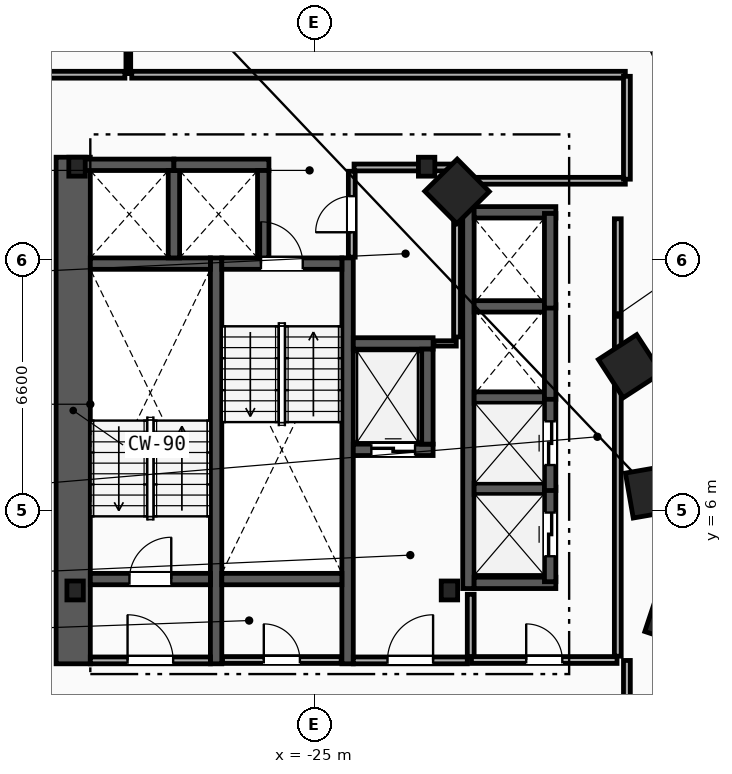
"""IFC4 building model, lengths in metres.
Left out: names, types, materials, properties, quantities, classifications, styles, units other than length and angle.
Written with IfcOpenShell. Run it as: python <this file> out.ifc"""

import sys

from ifc_helpers import new_model, si_unit, direction, frame, frame_2d, origin, origin_2d, place, context, subcontext, project, spatial, rectangle, i_section, extrude, element, fill, save


model = new_model("IFC4")
c1 = context("Model", 3, precision=1e-05, world=origin(), true_north=direction((0.0, 1.0)))
c2 = subcontext(c1, "Body", "Model", "MODEL_VIEW")
j1 = project(units=[si_unit("LENGTHUNIT", "METRE"), si_unit("PLANEANGLEUNIT", "RADIAN")], contexts=[c1])
p1 = place(None, origin())
s1 = spatial("IfcSite", under=j1, at=p1, CompositionType="ELEMENT")
p2 = place(p1, origin())
s2 = spatial("IfcBuilding", under=s1, at=p2, CompositionType="ELEMENT")
p3 = place(p2, frame((0.0, 0.0, 73.4)))
s3 = spatial("IfcBuildingStorey", under=s2, at=p3, CompositionType="ELEMENT", Elevation=73.4)
for number, where, z_axis, x_axis in (
    (1, (-31.3, 3.9, 0.0), (0.0, 0.0, 1.0), (1.0, 0.0, 0.0)),
    (2, (-21.45, 3.9, 0.0), (0.0, 0.0, 1.0), (1.0, 0.0, 0.0)),
    (3, (-22.05, 15.05, 0.0), (0.0, 0.0, 1.0), (1.0, 0.0, 0.0)),
    (4, (-31.25, 15.05, 0.0), (0.0, 0.0, 1.0), (1.0, 0.0, 0.0)),
):
    element("IfcColumn", number, at=place(p3, frame(where, z_axis=z_axis, x_axis=x_axis)), inside=s3, PredefinedType="COLUMN", context=c2, shape_type="SweptSolid", body=[
        extrude(i_section(OverallWidth=0.432, OverallDepth=0.498, WebThickness=0.056, FlangeThickness=0.089, FilletRadius=0.018, at=origin_2d()), origin(), (0.0, 0.0, 1.0), 3.8),
    ])
for number, where, z_axis, x_axis in (
    (5, (-15.55, 3.2, 0.0), (0.0, 0.0, 1.0), (0.315, 0.949, 0.0)),
    (6, (-16.125, 6.5, 0.0), (0.0, 0.0, 1.0), (-0.172, 0.985, 0.0)),
    (7, (-16.7, 9.8, 0.0), (0.0, 0.0, 1.0), (-0.544, 0.839, 0.0)),
    (8, (-21.25, 14.4, 0.0), (0.0, 0.0, 1.0), (-0.703, 0.711, 0.0)),
):
    element("IfcColumn", number, at=place(p3, frame(where, z_axis=z_axis, x_axis=x_axis)), inside=s3, PredefinedType="COLUMN", context=c2, shape_type="SweptSolid", body=[
        extrude(rectangle(XDim=1.2, YDim=1.2, at=origin_2d()), origin(), (0.0, 0.0, 1.0), 3.8),
    ])
p4 = place(p3, frame((-31.35, 1.97, 0.0), z_axis=(0.0, 0.0, 1.0), x_axis=(0.0, 1.0, 0.0)))
e9 = element("IfcWall", 9, at=p4, inside=s3, PredefinedType="SHEAR", context=c2, shape_type="SweptSolid", body=[
    extrude(rectangle(XDim=13.33, YDim=0.9, at=frame_2d((6.665, 0.0))), origin(), (0.0, 0.0, 1.0), 3.52),
])
for number, where, z_axis, x_axis in (
    (10, (-27.59, 1.97, 0.0), (0.0, 0.0, 1.0), (0.0, 1.0, 0.0)),
    (11, (-24.13, 1.97, 0.0), (0.0, 0.0, 1.0), (0.0, 1.0, 0.0)),
):
    element("IfcWall", number, at=place(p3, frame(where, z_axis=z_axis, x_axis=x_axis)), inside=s3, PredefinedType="SHEAR", context=c2, shape_type="SweptSolid", body=[
        extrude(rectangle(XDim=10.68, YDim=0.3, at=frame_2d((5.34, 0.0))), origin(), (0.0, 0.0, 1.0), 3.52),
    ])
p5 = place(p3, frame((-30.9, 4.2, 0.0), z_axis=(0.0, 0.0, 1.0), x_axis=(1.0, 0.0, 0.0)))
e12 = element("IfcWall", 12, at=p5, inside=s3, PredefinedType="SHEAR", context=c2, shape_type="SweptSolid", body=[
    extrude(rectangle(XDim=3.16, YDim=0.3, at=frame_2d((1.58, 0.0))), origin(), (0.0, 0.0, 1.0), 3.52),
])
p6 = place(p5, frame((1.03, 0.0, 0.0)))
e13 = element("IfcOpeningElement", 13, at=p6, cuts=e12, PredefinedType="OPENING", context=c2, shape_type="SweptSolid", body=[
    extrude(rectangle(XDim=1.1, YDim=2.15, at=frame_2d((0.55, 1.075))), frame((0.0, 0.16, 0.0), z_axis=(0.0, -1.0, 0.0), x_axis=(1.0, 0.0, 0.0)), (0.0, 0.0, 1.0), 0.32),
])
p7 = place(p3, frame((-30.9, 12.5, 0.0), z_axis=(0.0, 0.0, 1.0), x_axis=(1.0, 0.0, 0.0)))
e14 = element("IfcWall", 14, at=p7, inside=s3, PredefinedType="SHEAR", context=c2, shape_type="SweptSolid", body=[
    extrude(rectangle(XDim=3.16, YDim=0.3, at=frame_2d((1.58, 0.0))), origin(), (0.0, 0.0, 1.0), 3.52),
])
p8 = place(p3, frame((-27.44, 12.5, 0.0), z_axis=(0.0, 0.0, 1.0), x_axis=(1.0, 0.0, 0.0)))
e15 = element("IfcWall", 15, at=p8, inside=s3, PredefinedType="SHEAR", context=c2, shape_type="SweptSolid", body=[
    extrude(rectangle(XDim=3.16, YDim=0.3, at=frame_2d((1.58, 0.0))), origin(), (0.0, 0.0, 1.0), 3.52),
])
p9 = place(p8, frame((1.03, 0.0, 0.0)))
e16 = element("IfcOpeningElement", 16, at=p9, cuts=e15, PredefinedType="OPENING", context=c2, shape_type="SweptSolid", body=[
    extrude(rectangle(XDim=1.1, YDim=2.15, at=frame_2d((0.55, 1.075))), frame((0.0, 0.16, 0.0), z_axis=(0.0, -1.0, 0.0), x_axis=(1.0, 0.0, 0.0)), (0.0, 0.0, 1.0), 0.32),
])
p10 = place(p3, frame((-27.44, 4.2, 0.0), z_axis=(0.0, 0.0, 1.0), x_axis=(1.0, 0.0, 0.0)))
e17 = element("IfcWall", 17, at=p10, inside=s3, PredefinedType="SHEAR", context=c2, shape_type="SweptSolid", body=[
    extrude(rectangle(XDim=3.16, YDim=0.3, at=frame_2d((1.58, 0.0))), origin(), (0.0, 0.0, 1.0), 3.52),
])
p11 = place(p3, frame((-20.89, 2.15, 0.0), z_axis=(0.0, 0.0, 1.0), x_axis=(0.0, 1.0, 0.0)))
e18 = element("IfcWall", 18, at=p11, inside=s3, PredefinedType="PARTITIONING", context=c2, shape_type="SweptSolid", body=[
    extrude(rectangle(XDim=1.65, YDim=0.18, at=frame_2d((0.825, 0.0))), origin(), (0.0, 0.0, 1.0), 3.52),
])
p12 = place(p3, frame((-23.98, 2.06, 0.0), z_axis=(0.0, 0.0, 1.0), x_axis=(1.0, 0.0, 0.0)))
e19 = element("IfcWall", 19, at=p12, inside=s3, PredefinedType="PARTITIONING", context=c2, shape_type="SweptSolid", body=[
    extrude(rectangle(XDim=3.0, YDim=0.18, at=frame_2d((1.5, 0.0))), origin(), (0.0, 0.0, 1.0), 3.52),
])
p13 = place(p12, frame((0.9, 0.0, 0.0)))
e20 = element("IfcOpeningElement", 20, at=p13, cuts=e19, PredefinedType="OPENING", context=c2, shape_type="SweptSolid", body=[
    extrude(rectangle(XDim=1.2, YDim=2.15, at=frame_2d((0.6, 1.075))), frame((0.0, 0.1, 0.0), z_axis=(0.0, -1.0, 0.0), x_axis=(1.0, 0.0, 0.0)), (0.0, 0.0, 1.0), 0.2),
])
p14 = place(p3, frame((-30.9, 2.06, 0.0), z_axis=(0.0, 0.0, 1.0), x_axis=(1.0, 0.0, 0.0)))
e21 = element("IfcWall", 21, at=p14, inside=s3, PredefinedType="PARTITIONING", context=c2, shape_type="SweptSolid", body=[
    extrude(rectangle(XDim=3.16, YDim=0.18, at=frame_2d((1.58, 0.0))), origin(), (0.0, 0.0, 1.0), 3.52),
])
p15 = place(p14, frame((0.98, 0.0, 0.0)))
e22 = element("IfcOpeningElement", 22, at=p15, cuts=e21, PredefinedType="OPENING", context=c2, shape_type="SweptSolid", body=[
    extrude(rectangle(XDim=1.2, YDim=2.15, at=frame_2d((0.6, 1.075))), frame((0.0, 0.1, 0.0), z_axis=(0.0, -1.0, 0.0), x_axis=(1.0, 0.0, 0.0)), (0.0, 0.0, 1.0), 0.2),
])
p16 = place(p3, frame((-23.98, 7.6, 0.0), z_axis=(0.0, 0.0, 1.0), x_axis=(1.0, 0.0, 0.0)))
e23 = element("IfcWall", 23, at=p16, inside=s3, PredefinedType="SHEAR", context=c2, shape_type="SweptSolid", body=[
    extrude(rectangle(XDim=2.1, YDim=0.3, at=frame_2d((1.05, 0.0))), origin(), (0.0, 0.0, 1.0), 3.52),
])
p17 = place(p16, frame((0.475, 0.0, 0.0)))
e24 = element("IfcOpeningElement", 24, at=p17, cuts=e23, PredefinedType="OPENING", context=c2, shape_type="SweptSolid", body=[
    extrude(rectangle(XDim=1.15, YDim=2.2, at=frame_2d((0.575, 1.1))), frame((0.0, 0.16, 0.0), z_axis=(0.0, -1.0, 0.0), x_axis=(1.0, 0.0, 0.0)), (0.0, 0.0, 1.0), 0.32),
])
p18 = place(p3, frame((-23.98, 10.4, 0.0), z_axis=(0.0, 0.0, 1.0), x_axis=(1.0, 0.0, 0.0)))
e25 = element("IfcWall", 25, at=p18, inside=s3, PredefinedType="SHEAR", context=c2, shape_type="SweptSolid", body=[
    extrude(rectangle(XDim=2.1, YDim=0.3, at=frame_2d((1.05, 0.0))), origin(), (0.0, 0.0, 1.0), 3.52),
])
for number, where, z_axis, x_axis in (
    (26, (-22.03, 7.75, 0.0), (0.0, 0.0, 1.0), (0.0, 1.0, 0.0)),
    (27, (-31.2, 15.1, 0.0), (0.0, 0.0, 1.0), (1.0, 0.0, 0.0)),
):
    element("IfcWall", number, at=place(p3, frame(where, z_axis=z_axis, x_axis=x_axis)), inside=s3, PredefinedType="SHEAR", context=c2, shape_type="SweptSolid", body=[
        extrude(rectangle(XDim=2.5, YDim=0.3, at=frame_2d((1.25, 0.0))), origin(), (0.0, 0.0, 1.0), 3.52),
    ])
p19 = place(p3, frame((-28.7, 12.65, 0.0), z_axis=(0.0, 0.0, 1.0), x_axis=(0.0, 1.0, 0.0)))
e28 = element("IfcWall", 28, at=p19, inside=s3, PredefinedType="SHEAR", context=c2, shape_type="SweptSolid", body=[
    extrude(rectangle(XDim=2.3, YDim=0.3, at=frame_2d((1.15, 0.0))), origin(), (0.0, 0.0, 1.0), 3.52),
])
p20 = place(p3, frame((-28.7, 15.1, 0.0), z_axis=(0.0, 0.0, 1.0), x_axis=(1.0, 0.0, 0.0)))
e29 = element("IfcWall", 29, at=p20, inside=s3, PredefinedType="SHEAR", context=c2, shape_type="SweptSolid", body=[
    extrude(rectangle(XDim=2.5, YDim=0.3, at=frame_2d((1.25, 0.0))), origin(), (0.0, 0.0, 1.0), 3.52),
])
p21 = place(p3, frame((-26.35, 12.65, 0.0), z_axis=(0.0, 0.0, 1.0), x_axis=(0.0, 1.0, 0.0)))
e30 = element("IfcWall", 30, at=p21, inside=s3, PredefinedType="SHEAR", context=c2, shape_type="SweptSolid", body=[
    extrude(rectangle(XDim=2.3, YDim=0.3, at=frame_2d((1.15, 0.0))), origin(), (0.0, 0.0, 1.0), 3.52),
])
p22 = place(p3, frame((-20.95, 3.95, 0.0), z_axis=(0.0, 0.0, 1.0), x_axis=(0.0, 1.0, 0.0)))
e31 = element("IfcWall", 31, at=p22, inside=s3, PredefinedType="SHEAR", context=c2, shape_type="SweptSolid", body=[
    extrude(rectangle(XDim=10.05, YDim=0.3, at=frame_2d((5.025, 0.0))), origin(), (0.0, 0.0, 1.0), 3.52),
])
for number, where, z_axis, x_axis in (
    (32, (-20.8, 4.1, 0.0), (0.0, 0.0, 1.0), (1.0, 0.0, 0.0)),
    (33, (-20.8, 13.85, 0.0), (0.0, 0.0, 1.0), (1.0, 0.0, 0.0)),
):
    element("IfcWall", number, at=place(p3, frame(where, z_axis=z_axis, x_axis=x_axis)), inside=s3, PredefinedType="SHEAR", context=c2, shape_type="SweptSolid", body=[
        extrude(rectangle(XDim=2.15, YDim=0.3, at=frame_2d((1.075, 0.0))), origin(), (0.0, 0.0, 1.0), 3.52),
    ])
for number, where, z_axis, x_axis in (
    (34, (-20.8, 6.575, 0.0), (0.0, 0.0, 1.0), (1.0, 0.0, 0.0)),
    (35, (-20.8, 8.975, 0.0), (0.0, 0.0, 1.0), (1.0, 0.0, 0.0)),
    (36, (-20.8, 11.375, 0.0), (0.0, 0.0, 1.0), (1.0, 0.0, 0.0)),
):
    element("IfcWall", number, at=place(p3, frame(where, z_axis=z_axis, x_axis=x_axis)), inside=s3, PredefinedType="SHEAR", context=c2, shape_type="SweptSolid", body=[
        extrude(rectangle(XDim=1.85, YDim=0.3, at=frame_2d((0.925, 0.0))), origin(), (0.0, 0.0, 1.0), 3.52),
    ])
p23 = place(p3, frame((-18.8, 4.13, 0.0), z_axis=(0.0, 0.0, 1.0), x_axis=(0.0, 1.0, 0.0)))
e37 = element("IfcWall", 37, at=p23, inside=s3, PredefinedType="SHEAR", context=c2, shape_type="SweptSolid", body=[
    extrude(rectangle(XDim=2.49, YDim=0.3, at=frame_2d((1.245, 0.0))), origin(), (0.0, 0.0, 1.0), 3.52),
])
p24 = place(p23, frame((0.67, 0.0, 0.0)))
e38 = element("IfcOpeningElement", 38, at=p24, cuts=e37, PredefinedType="OPENING", context=c2, shape_type="SweptSolid", body=[
    extrude(rectangle(XDim=1.15, YDim=2.2, at=frame_2d((0.575, 1.1))), frame((0.0, 0.16, 0.0), z_axis=(0.0, -1.0, 0.0), x_axis=(1.0, 0.0, 0.0)), (0.0, 0.0, 1.0), 0.32),
])
p25 = place(p3, frame((-18.8, 6.53, 0.0), z_axis=(0.0, 0.0, 1.0), x_axis=(0.0, 1.0, 0.0)))
e39 = element("IfcWall", 39, at=p25, inside=s3, PredefinedType="SHEAR", context=c2, shape_type="SweptSolid", body=[
    extrude(rectangle(XDim=2.49, YDim=0.3, at=frame_2d((1.245, 0.0))), origin(), (0.0, 0.0, 1.0), 3.52),
])
p26 = place(p25, frame((0.67, 0.0, 0.0)))
e40 = element("IfcOpeningElement", 40, at=p26, cuts=e39, PredefinedType="OPENING", context=c2, shape_type="SweptSolid", body=[
    extrude(rectangle(XDim=1.15, YDim=2.2, at=frame_2d((0.575, 1.1))), frame((0.0, 0.16, 0.0), z_axis=(0.0, -1.0, 0.0), x_axis=(1.0, 0.0, 0.0)), (0.0, 0.0, 1.0), 0.32),
])
for number, where, z_axis, x_axis in (
    (41, (-18.8, 8.93, 0.0), (0.0, 0.0, 1.0), (0.0, 1.0, 0.0)),
    (42, (-18.8, 11.33, 0.0), (0.0, 0.0, 1.0), (0.0, 1.0, 0.0)),
):
    element("IfcWall", number, at=place(p3, frame(where, z_axis=z_axis, x_axis=x_axis)), inside=s3, PredefinedType="SHEAR", context=c2, shape_type="SweptSolid", body=[
        extrude(rectangle(XDim=2.49, YDim=0.3, at=frame_2d((1.245, 0.0))), origin(), (0.0, 0.0, 1.0), 3.52),
    ])
p27 = place(p3, frame((-17.02, 2.17, 0.0), z_axis=(0.0, 0.0, 1.0), x_axis=(0.0, 1.0, 0.0)))
e43 = element("IfcWall", 43, at=p27, inside=s3, PredefinedType="PARTITIONING", context=c2, shape_type="SweptSolid", body=[
    extrude(rectangle(XDim=11.51, YDim=0.18, at=frame_2d((5.755, 0.0))), origin(), (0.0, 0.0, 1.0), 3.52),
])
p28 = place(p3, frame((-20.87, 2.07, 0.0), z_axis=(0.0, 0.0, 1.0), x_axis=(1.0, 0.0, 0.0)))
e44 = element("IfcWall", 44, at=p28, inside=s3, PredefinedType="PARTITIONING", context=c2, shape_type="SweptSolid", body=[
    extrude(rectangle(XDim=3.83, YDim=0.18, at=frame_2d((1.915, 0.0))), origin(), (0.0, 0.0, 1.0), 3.52),
])
p29 = place(p28, frame((1.44, 0.0, 0.0)))
e45 = element("IfcOpeningElement", 45, at=p29, cuts=e44, PredefinedType="OPENING", context=c2, shape_type="SweptSolid", body=[
    extrude(rectangle(XDim=0.95, YDim=2.1, at=frame_2d((0.475, 1.05))), frame((0.0, 0.1, 0.0), z_axis=(0.0, -1.0, 0.0), x_axis=(1.0, 0.0, 0.0)), (0.0, 0.0, 1.0), 0.2),
])
p30 = place(p3, frame((-21.86, 10.4, 0.0), z_axis=(0.0, 0.0, 1.0), x_axis=(1.0, 0.0, 0.0)))
e46 = element("IfcWall", 46, at=p30, inside=s3, PredefinedType="PARTITIONING", context=c2, shape_type="SweptSolid", body=[
    extrude(rectangle(XDim=0.59, YDim=0.14, at=frame_2d((0.295, 0.0))), origin(), (0.0, 0.0, 1.0), 3.52),
])
p31 = place(p3, frame((-21.25, 10.57, 0.0), z_axis=(0.0, 0.0, 1.0), x_axis=(0.0, 1.0, 0.0)))
e47 = element("IfcWall", 47, at=p31, inside=s3, PredefinedType="PARTITIONING", context=c2, shape_type="SweptSolid", body=[
    extrude(rectangle(XDim=4.36, YDim=0.18, at=frame_2d((2.18, 0.0))), origin(), (0.0, 0.0, 1.0), 3.52),
])
p32 = place(p3, frame((-23.96, 15.03, 0.0), z_axis=(0.0, 0.0, 1.0), x_axis=(1.0, 0.0, 0.0)))
e48 = element("IfcWall", 48, at=p32, inside=s3, PredefinedType="PARTITIONING", context=c2, shape_type="SweptSolid", body=[
    extrude(rectangle(XDim=2.61, YDim=0.18, at=frame_2d((1.305, 0.0))), origin(), (0.0, 0.0, 1.0), 2.593),
])
p33 = place(p3, frame((-27.42, 2.07, 0.0), z_axis=(0.0, 0.0, 1.0), x_axis=(1.0, 0.0, 0.0)))
e49 = element("IfcWall", 49, at=p33, inside=s3, PredefinedType="PARTITIONING", context=c2, shape_type="SweptSolid", body=[
    extrude(rectangle(XDim=3.12, YDim=0.18, at=frame_2d((1.56, 0.0))), origin(), (0.0, 0.0, 1.0), 3.52),
])
p34 = place(p33, frame((1.085, 0.0, 0.0)))
e50 = element("IfcOpeningElement", 50, at=p34, cuts=e49, PredefinedType="OPENING", context=c2, shape_type="SweptSolid", body=[
    extrude(rectangle(XDim=0.95, YDim=2.1, at=frame_2d((0.475, 1.05))), frame((0.0, 0.1, 0.0), z_axis=(0.0, -1.0, 0.0), x_axis=(1.0, 0.0, 0.0)), (0.0, 0.0, 1.0), 0.2),
])
p35 = place(p3, frame((-24.02, 12.67, 0.0), z_axis=(0.0, 0.0, 1.0), x_axis=(0.0, 1.0, 0.0)))
e51 = element("IfcWall", 51, at=p35, inside=s3, PredefinedType="PARTITIONING", context=c2, shape_type="SweptSolid", body=[
    extrude(rectangle(XDim=2.26, YDim=0.18, at=frame_2d((1.13, 0.0))), origin(), (0.0, 0.0, 1.0), 3.52),
])
p36 = place(p35, frame((0.655, 0.0, 0.0)))
e52 = element("IfcOpeningElement", 52, at=p36, cuts=e51, PredefinedType="OPENING", context=c2, shape_type="SweptSolid", body=[
    extrude(rectangle(XDim=0.95, YDim=2.1, at=frame_2d((0.475, 1.05))), frame((0.0, 0.1, 0.0), z_axis=(0.0, -1.0, 0.0), x_axis=(1.0, 0.0, 0.0)), (0.0, 0.0, 1.0), 0.2),
])
p37 = place(p3, frame((-29.9, 17.5, 0.0), z_axis=(0.0, 0.0, 1.0), x_axis=(0.0, 1.0, 0.0)))
e53 = element("IfcWall", 53, at=p37, inside=s3, PredefinedType="PARTITIONING", context=c2, shape_type="SweptSolid", body=[
    extrude(rectangle(XDim=8.485, YDim=0.125, at=frame_2d((4.243, 0.0))), origin(), (0.0, 0.0, 1.0), 3.52),
])
p38 = place(p3, frame((-16.822, 17.47, 0.0), z_axis=(0.0, 0.0, 1.0), x_axis=(-1.0, 0.0, 0.0)))
e54 = element("IfcWall", 54, at=p38, inside=s3, PredefinedType="PARTITIONING", context=c2, shape_type="SweptSolid", body=[
    extrude(rectangle(XDim=12.989, YDim=0.18, at=frame_2d((6.494, 0.0))), origin(), (0.0, 0.0, 1.0), 3.52),
])
p39 = place(p3, frame((-21.178, 14.68, 0.0), z_axis=(0.0, 0.0, 1.0), x_axis=(1.0, 0.0, 0.0)))
e55 = element("IfcWall", 55, at=p39, inside=s3, PredefinedType="PARTITIONING", context=c2, shape_type="SweptSolid", body=[
    extrude(rectangle(XDim=4.357, YDim=0.18, at=frame_2d((2.178, 0.0))), origin(), (0.0, 0.0, 1.0), 3.52),
])
p40 = place(p3, frame((-29.99, 17.47, 0.0), z_axis=(0.0, 0.0, 1.0), x_axis=(-1.0, 0.0, 0.0)))
e56 = element("IfcWall", 56, at=p40, inside=s3, PredefinedType="PARTITIONING", context=c2, shape_type="SweptSolid", body=[
    extrude(rectangle(XDim=3.638, YDim=0.18, at=frame_2d((1.819, 0.0))), origin(), (0.0, 0.0, 1.0), 3.52),
])
p41 = place(p3, frame((-16.78, 14.721, 0.0), z_axis=(0.0, 0.0, 1.0), x_axis=(0.0, 1.0, 0.0)))
e57 = element("IfcWall", 57, at=p41, inside=s3, PredefinedType="PARTITIONING", context=c2, shape_type="SweptSolid", body=[
    extrude(rectangle(XDim=2.707, YDim=0.18, at=frame_2d((1.354, 0.0))), origin(), (0.0, 0.0, 1.0), 3.52),
])
p42 = place(p3, frame((-16.78, -0.329, 0.0), z_axis=(0.0, 0.0, 1.0), x_axis=(0.0, 1.0, 0.0)))
e58 = element("IfcWall", 58, at=p42, inside=s3, PredefinedType="PARTITIONING", context=c2, shape_type="SweptSolid", body=[
    extrude(rectangle(XDim=2.387, YDim=0.18, at=frame_2d((1.194, 0.0))), origin(), (0.0, 0.0, 1.0), 3.52),
])
p43 = place(p6, origin())
e59 = element("IfcDoor", 59, at=p43, inside=s3, OperationType="SINGLE_SWING_RIGHT", PredefinedType="DOOR", context=c2, shape_type="SweptSolid", body=[
    extrude(rectangle(XDim=1.1, YDim=2.15, at=frame_2d((0.55, 1.075))), frame((0.0, 0.025, 0.0), z_axis=(0.0, -1.0, 0.0), x_axis=(1.0, 0.0, 0.0)), (0.0, 0.0, 1.0), 0.05),
])
fill(e13, e59)
p44 = place(p9, origin())
e60 = element("IfcDoor", 60, at=p44, inside=s3, OperationType="SINGLE_SWING_LEFT", PredefinedType="DOOR", context=c2, shape_type="SweptSolid", body=[
    extrude(rectangle(XDim=1.1, YDim=2.15, at=frame_2d((0.55, 1.075))), frame((0.0, 0.025, 0.0), z_axis=(0.0, -1.0, 0.0), x_axis=(1.0, 0.0, 0.0)), (0.0, 0.0, 1.0), 0.05),
])
fill(e16, e60)
p45 = place(p13, origin())
e61 = element("IfcDoor", 61, at=p45, inside=s3, OperationType="SINGLE_SWING_RIGHT", PredefinedType="DOOR", context=c2, shape_type="SweptSolid", body=[
    extrude(rectangle(XDim=1.2, YDim=2.15, at=frame_2d((0.6, 1.075))), frame((0.0, 0.025, 0.0), z_axis=(0.0, -1.0, 0.0), x_axis=(1.0, 0.0, 0.0)), (0.0, 0.0, 1.0), 0.05),
])
fill(e20, e61)
p46 = place(p15, origin())
e62 = element("IfcDoor", 62, at=p46, inside=s3, OperationType="SINGLE_SWING_LEFT", PredefinedType="DOOR", context=c2, shape_type="SweptSolid", body=[
    extrude(rectangle(XDim=1.2, YDim=2.15, at=frame_2d((0.6, 1.075))), frame((0.0, 0.025, 0.0), z_axis=(0.0, -1.0, 0.0), x_axis=(1.0, 0.0, 0.0)), (0.0, 0.0, 1.0), 0.05),
])
fill(e22, e62)
p47 = place(p17, origin())
e63 = element("IfcDoor", 63, at=p47, inside=s3, OperationType="SLIDING_TO_LEFT", PredefinedType="TRAPDOOR", context=c2, shape_type="SweptSolid", body=[
    extrude(rectangle(XDim=1.15, YDim=2.2, at=frame_2d((0.575, 1.1))), frame((0.0, 0.025, 0.0), z_axis=(0.0, -1.0, 0.0), x_axis=(1.0, 0.0, 0.0)), (0.0, 0.0, 1.0), 0.05),
])
fill(e24, e63)
p48 = place(p24, origin())
e64 = element("IfcDoor", 64, at=p48, inside=s3, OperationType="SLIDING_TO_LEFT", PredefinedType="TRAPDOOR", context=c2, shape_type="SweptSolid", body=[
    extrude(rectangle(XDim=1.15, YDim=2.2, at=frame_2d((0.575, 1.1))), frame((0.0, 0.025, 0.0), z_axis=(0.0, -1.0, 0.0), x_axis=(1.0, 0.0, 0.0)), (0.0, 0.0, 1.0), 0.05),
])
fill(e38, e64)
p49 = place(p26, origin())
e65 = element("IfcDoor", 65, at=p49, inside=s3, OperationType="SLIDING_TO_LEFT", PredefinedType="TRAPDOOR", context=c2, shape_type="SweptSolid", body=[
    extrude(rectangle(XDim=1.15, YDim=2.2, at=frame_2d((0.575, 1.1))), frame((0.0, 0.025, 0.0), z_axis=(0.0, -1.0, 0.0), x_axis=(1.0, 0.0, 0.0)), (0.0, 0.0, 1.0), 0.05),
])
fill(e40, e65)
p50 = place(p29, origin())
e66 = element("IfcDoor", 66, at=p50, inside=s3, OperationType="SINGLE_SWING_LEFT", PredefinedType="DOOR", context=c2, shape_type="SweptSolid", body=[
    extrude(rectangle(XDim=0.95, YDim=2.1, at=frame_2d((0.475, 1.05))), frame((0.0, 0.025, 0.0), z_axis=(0.0, -1.0, 0.0), x_axis=(1.0, 0.0, 0.0)), (0.0, 0.0, 1.0), 0.05),
])
fill(e45, e66)
p51 = place(p34, origin())
e67 = element("IfcDoor", 67, at=p51, inside=s3, OperationType="SINGLE_SWING_LEFT", PredefinedType="DOOR", context=c2, shape_type="SweptSolid", body=[
    extrude(rectangle(XDim=0.95, YDim=2.1, at=frame_2d((0.475, 1.05))), frame((0.0, 0.025, 0.0), z_axis=(0.0, -1.0, 0.0), x_axis=(1.0, 0.0, 0.0)), (0.0, 0.0, 1.0), 0.05),
])
fill(e50, e67)
p52 = place(p36, origin())
e68 = element("IfcDoor", 68, at=p52, inside=s3, OperationType="SINGLE_SWING_LEFT", PredefinedType="DOOR", context=c2, shape_type="SweptSolid", body=[
    extrude(rectangle(XDim=0.95, YDim=2.1, at=frame_2d((0.475, 1.05))), frame((0.0, 0.025, 0.0), z_axis=(0.0, -1.0, 0.0), x_axis=(1.0, 0.0, 0.0)), (0.0, 0.0, 1.0), 0.05),
])
fill(e52, e68)
save(model, sys.argv[1])
